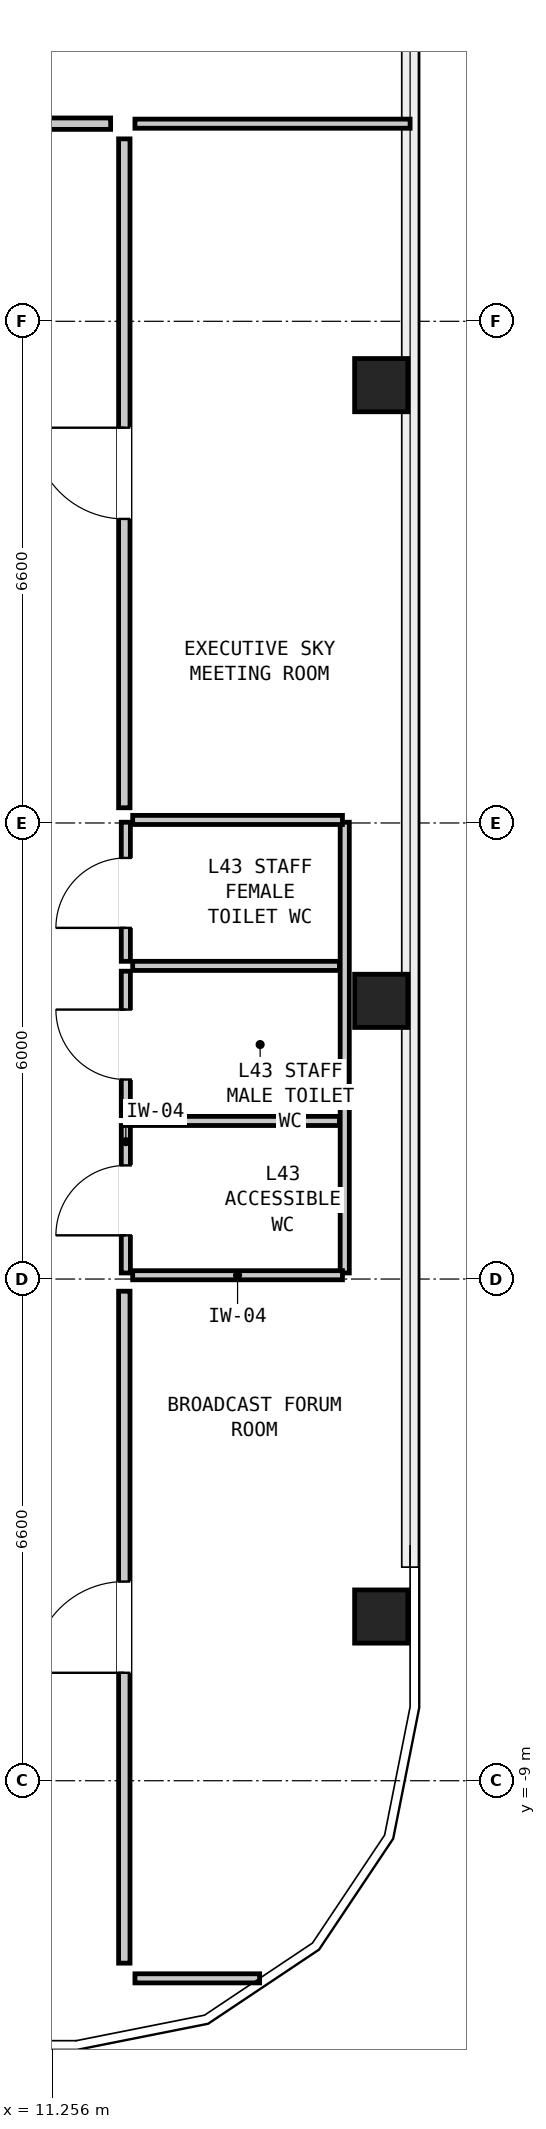
"""IFC4 building model, lengths in metres.
Left out: names, types, materials, properties, quantities, classifications, styles, units other than length and angle.
Written with IfcOpenShell. Run it as: python <this file> out.ifc"""

import sys

from ifc_helpers import new_model, si_unit, direction, frame, frame_2d, origin, origin_2d, place, context, subcontext, project, spatial, rectangle, hollow_rectangle, extrude, element, fill, save


model = new_model("IFC4")
c1 = context("Model", 3, precision=1e-05, world=origin(), true_north=direction((0.0, 1.0)))
c2 = subcontext(c1, "Body", "Model", "MODEL_VIEW")
j1 = project(units=[si_unit("LENGTHUNIT", "METRE"), si_unit("PLANEANGLEUNIT", "RADIAN")], contexts=[c1])
p1 = place(None, origin())
s1 = spatial("IfcSite", under=j1, at=p1, CompositionType="ELEMENT")
p2 = place(p1, origin())
s2 = spatial("IfcBuilding", under=s1, at=p2, CompositionType="ELEMENT")
p3 = place(p2, frame((0.0, 0.0, 148.2)))
s3 = spatial("IfcBuildingStorey", under=s2, at=p3, CompositionType="ELEMENT", Elevation=148.2)
for number, where, z_axis, x_axis in (
    (1, (15.58, -6.84, 0.0), (0.0, 0.0, 1.0), (0.0, 1.0, 0.0)),
    (2, (15.58, 1.26, 0.0), (0.0, 0.0, 1.0), (0.0, 1.0, 0.0)),
    (3, (15.58, 9.36, 0.0), (0.0, 0.0, 1.0), (0.0, 1.0, 0.0)),
):
    element("IfcColumn", number, at=place(p3, frame(where, z_axis=z_axis, x_axis=x_axis)), inside=s3, PredefinedType="COLUMN", context=c2, shape_type="SweptSolid", body=[
        extrude(hollow_rectangle(XDim=0.7, YDim=0.7, WallThickness=0.045, at=origin_2d()), origin(), (0.0, 0.0, 1.0), 3.6),
    ])
p4 = place(p3, frame((12.22, -2.32, 0.0), z_axis=(0.0, 0.0, 1.0), x_axis=(0.0, 1.0, 0.0)))
e4 = element("IfcWall", 4, at=p4, inside=s3, PredefinedType="PARTITIONING", context=c2, shape_type="SweptSolid", body=[
    extrude(rectangle(XDim=1.94, YDim=0.12, at=frame_2d((0.97, 0.0))), origin(), (0.0, 0.0, 1.0), 3.22),
])
p5 = place(p4, frame((0.495, 0.0, 0.0)))
e5 = element("IfcOpeningElement", 5, at=p5, cuts=e4, PredefinedType="OPENING", context=c2, shape_type="SweptSolid", body=[
    extrude(rectangle(XDim=0.92, YDim=2.1, at=frame_2d((0.46, 1.05))), frame((0.0, 0.072, 0.0), z_axis=(0.0, -1.0, 0.0), x_axis=(1.0, 0.0, 0.0)), (0.0, 0.0, 1.0), 0.144),
])
p6 = place(p3, frame((12.22, -0.25, 0.0), z_axis=(0.0, 0.0, 1.0), x_axis=(0.0, 1.0, 0.0)))
e6 = element("IfcWall", 6, at=p6, inside=s3, PredefinedType="PARTITIONING", context=c2, shape_type="SweptSolid", body=[
    extrude(rectangle(XDim=1.9, YDim=0.12, at=frame_2d((0.95, 0.0))), origin(), (0.0, 0.0, 1.0), 3.22),
])
p7 = place(p6, frame((0.475, 0.0, 0.0)))
e7 = element("IfcOpeningElement", 7, at=p7, cuts=e6, PredefinedType="OPENING", context=c2, shape_type="SweptSolid", body=[
    extrude(rectangle(XDim=0.92, YDim=2.1, at=frame_2d((0.46, 1.05))), frame((0.0, 0.072, 0.0), z_axis=(0.0, -1.0, 0.0), x_axis=(1.0, 0.0, 0.0)), (0.0, 0.0, 1.0), 0.144),
])
p8 = place(p3, frame((12.22, 1.78, 0.0), z_axis=(0.0, 0.0, 1.0), x_axis=(0.0, 1.0, 0.0)))
e8 = element("IfcWall", 8, at=p8, inside=s3, PredefinedType="PARTITIONING", context=c2, shape_type="SweptSolid", body=[
    extrude(rectangle(XDim=1.83, YDim=0.12, at=frame_2d((0.915, 0.0))), origin(), (0.0, 0.0, 1.0), 3.22),
])
p9 = place(p8, frame((0.44, 0.0, 0.0)))
e9 = element("IfcOpeningElement", 9, at=p9, cuts=e8, PredefinedType="OPENING", context=c2, shape_type="SweptSolid", body=[
    extrude(rectangle(XDim=0.92, YDim=2.1, at=frame_2d((0.46, 1.05))), frame((0.0, 0.072, 0.0), z_axis=(0.0, -1.0, 0.0), x_axis=(1.0, 0.0, 0.0)), (0.0, 0.0, 1.0), 0.144),
])
p10 = place(p3, frame((15.1, -2.32, 0.0), z_axis=(0.0, 0.0, 1.0), x_axis=(0.0, 1.0, 0.0)))
e10 = element("IfcWall", 10, at=p10, inside=s3, PredefinedType="PARTITIONING", context=c2, shape_type="SweptSolid", body=[
    extrude(rectangle(XDim=5.93, YDim=0.12, at=frame_2d((2.965, 0.0))), origin(), (0.0, 0.0, 1.0), 2.082),
])
for number, where, z_axis, x_axis in (
    (11, (12.31, -2.35, 0.0), (0.0, 0.0, 1.0), (1.0, 0.0, 0.0)),
    (12, (12.31, 3.64, 0.0), (0.0, 0.0, 1.0), (1.0, 0.0, 0.0)),
):
    element("IfcWall", number, at=place(p3, frame(where, z_axis=z_axis, x_axis=x_axis)), inside=s3, PredefinedType="PARTITIONING", context=c2, shape_type="SweptSolid", body=[
        extrude(rectangle(XDim=2.76, YDim=0.12, at=frame_2d((1.38, 0.0))), origin(), (0.0, 0.0, 1.0), 2.42),
    ])
for number, where, z_axis, x_axis in (
    (13, (12.31, -0.32, 0.0), (0.0, 0.0, 1.0), (1.0, 0.0, 0.0)),
    (14, (12.31, 1.72, 0.0), (0.0, 0.0, 1.0), (1.0, 0.0, 0.0)),
):
    element("IfcWall", number, at=place(p3, frame(where, z_axis=z_axis, x_axis=x_axis)), inside=s3, PredefinedType="PARTITIONING", context=c2, shape_type="SweptSolid", body=[
        extrude(rectangle(XDim=2.72, YDim=0.12, at=frame_2d((1.36, 0.0))), origin(), (0.0, 0.0, 1.0), 3.22),
    ])
p11 = place(p3, frame((12.34, 12.8, 0.0), z_axis=(0.0, 0.0, 1.0), x_axis=(1.0, 0.0, 0.0)))
e15 = element("IfcWall", 15, at=p11, inside=s3, PredefinedType="PARTITIONING", context=c2, shape_type="SweptSolid", body=[
    extrude(rectangle(XDim=3.62, YDim=0.12, at=frame_2d((1.81, 0.0))), origin(), (0.0, 0.0, 1.0), 3.22),
])
p12 = place(p3, frame((12.34, -11.6, 0.0), z_axis=(0.0, 0.0, 1.0), x_axis=(1.0, 0.0, 0.0)))
e16 = element("IfcWall", 16, at=p12, inside=s3, PredefinedType="PARTITIONING", context=c2, shape_type="SweptSolid", body=[
    extrude(rectangle(XDim=1.64, YDim=0.12, at=frame_2d((0.82, 0.0))), origin(), (0.0, 0.0, 1.0), 3.22),
])
p13 = place(p3, frame((3.78, 12.8, 0.0), z_axis=(0.0, 0.0, 1.0), x_axis=(1.0, 0.0, 0.0)))
e17 = element("IfcWall", 17, at=p13, inside=s3, PredefinedType="PARTITIONING", context=c2, shape_type="SweptSolid", body=[
    extrude(rectangle(XDim=8.24, YDim=0.15, at=frame_2d((4.12, 0.0))), origin(), (0.0, 0.0, 1.0), 3.22),
])
p14 = place(p13, frame((3.645, 0.0, 0.0)))
e18 = element("IfcOpeningElement", 18, at=p14, cuts=e17, PredefinedType="OPENING", context=c2, shape_type="SweptSolid", body=[
    extrude(rectangle(XDim=0.95, YDim=2.1, at=frame_2d((0.475, 1.05))), frame((0.0, 0.087, 0.0), z_axis=(0.0, -1.0, 0.0), x_axis=(1.0, 0.0, 0.0)), (0.0, 0.0, 1.0), 0.174),
])
p15 = place(p3, frame((12.2, -11.4, 0.0), z_axis=(0.0, 0.0, 1.0), x_axis=(0.0, 1.0, 0.0)))
e19 = element("IfcWall", 19, at=p15, inside=s3, PredefinedType="PARTITIONING", context=c2, shape_type="SweptSolid", body=[
    extrude(rectangle(XDim=8.84, YDim=0.15, at=frame_2d((4.42, 0.0))), origin(), (0.0, 0.0, 1.0), 3.22),
])
p16 = place(p15, frame((3.82, 0.0, 0.0)))
e20 = element("IfcOpeningElement", 20, at=p16, cuts=e19, PredefinedType="OPENING", context=c2, shape_type="SweptSolid", body=[
    extrude(rectangle(XDim=1.2, YDim=2.1, at=frame_2d((0.6, 1.05))), frame((0.0, 0.087, 0.0), z_axis=(0.0, -1.0, 0.0), x_axis=(1.0, 0.0, 0.0)), (0.0, 0.0, 1.0), 0.174),
])
p17 = place(p3, frame((12.2, 3.8, 0.0), z_axis=(0.0, 0.0, 1.0), x_axis=(0.0, 1.0, 0.0)))
e21 = element("IfcWall", 21, at=p17, inside=s3, PredefinedType="PARTITIONING", context=c2, shape_type="SweptSolid", body=[
    extrude(rectangle(XDim=8.8, YDim=0.15, at=frame_2d((4.4, 0.0))), origin(), (0.0, 0.0, 1.0), 3.22),
])
p18 = place(p17, frame((3.8, 0.0, 0.0)))
e22 = element("IfcOpeningElement", 22, at=p18, cuts=e21, PredefinedType="OPENING", context=c2, shape_type="SweptSolid", body=[
    extrude(rectangle(XDim=1.2, YDim=2.1, at=frame_2d((0.6, 1.05))), frame((0.0, 0.087, 0.0), z_axis=(0.0, -1.0, 0.0), x_axis=(1.0, 0.0, 0.0)), (0.0, 0.0, 1.0), 0.174),
])
p19 = place(p5, origin())
e23 = element("IfcDoor", 23, at=p19, inside=s3, OperationType="SINGLE_SWING_LEFT", PredefinedType="DOOR", context=c2, shape_type="SweptSolid", body=[
    extrude(rectangle(XDim=0.92, YDim=2.1, at=frame_2d((0.46, 1.05))), frame((0.0, 0.025, 0.0), z_axis=(0.0, -1.0, 0.0), x_axis=(1.0, 0.0, 0.0)), (0.0, 0.0, 1.0), 0.05),
])
fill(e5, e23)
p20 = place(p7, origin())
e24 = element("IfcDoor", 24, at=p20, inside=s3, OperationType="SINGLE_SWING_RIGHT", PredefinedType="DOOR", context=c2, shape_type="SweptSolid", body=[
    extrude(rectangle(XDim=0.92, YDim=2.1, at=frame_2d((0.46, 1.05))), frame((0.0, 0.025, 0.0), z_axis=(0.0, -1.0, 0.0), x_axis=(1.0, 0.0, 0.0)), (0.0, 0.0, 1.0), 0.05),
])
fill(e7, e24)
p21 = place(p9, origin())
e25 = element("IfcDoor", 25, at=p21, inside=s3, OperationType="SINGLE_SWING_LEFT", PredefinedType="DOOR", context=c2, shape_type="SweptSolid", body=[
    extrude(rectangle(XDim=0.92, YDim=2.1, at=frame_2d((0.46, 1.05))), frame((0.0, 0.025, 0.0), z_axis=(0.0, -1.0, 0.0), x_axis=(1.0, 0.0, 0.0)), (0.0, 0.0, 1.0), 0.05),
])
fill(e9, e25)
p22 = place(p16, origin())
e26 = element("IfcDoor", 26, at=p22, inside=s3, OperationType="SINGLE_SWING_LEFT", PredefinedType="DOOR", context=c2, shape_type="SweptSolid", body=[
    extrude(rectangle(XDim=1.2, YDim=2.1, at=frame_2d((0.6, 1.05))), frame((0.0, 0.025, 0.0), z_axis=(0.0, -1.0, 0.0), x_axis=(1.0, 0.0, 0.0)), (0.0, 0.0, 1.0), 0.05),
])
fill(e20, e26)
p23 = place(p18, origin())
e27 = element("IfcDoor", 27, at=p23, inside=s3, OperationType="SINGLE_SWING_RIGHT", PredefinedType="DOOR", context=c2, shape_type="SweptSolid", body=[
    extrude(rectangle(XDim=1.2, YDim=2.1, at=frame_2d((0.6, 1.05))), frame((0.0, 0.025, 0.0), z_axis=(0.0, -1.0, 0.0), x_axis=(1.0, 0.0, 0.0)), (0.0, 0.0, 1.0), 0.05),
])
fill(e22, e27)
save(model, sys.argv[1])
